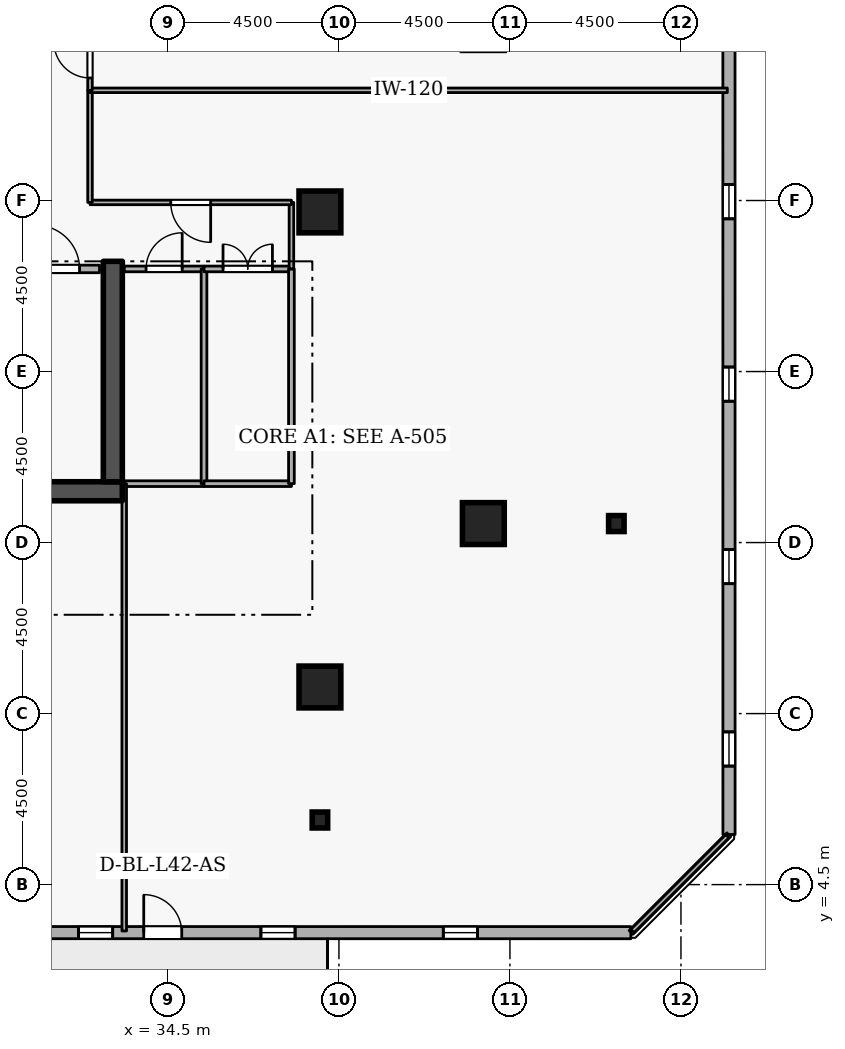
"""IFC4 building model, lengths in metres.
Left out: names, types, materials, properties, quantities, classifications, styles, units other than length and angle.
Written with IfcOpenShell. Run it as: python <this file> out.ifc"""

import sys

from ifc_helpers import new_model, si_unit, direction, frame, frame_2d, origin, origin_2d, place, context, subcontext, project, spatial, rectangle, i_section, extrude, element, fill, save


model = new_model("IFC4")
c1 = context("Model", 3, precision=1e-05, world=origin(), true_north=direction((0.0, 1.0)))
c2 = subcontext(c1, "Body", "Model", "MODEL_VIEW")
j1 = project(units=[si_unit("LENGTHUNIT", "METRE"), si_unit("PLANEANGLEUNIT", "RADIAN")], contexts=[c1])
p1 = place(None, origin())
s1 = spatial("IfcSite", under=j1, at=p1, CompositionType="ELEMENT")
p2 = place(p1, origin())
s2 = spatial("IfcBuilding", under=s1, at=p2, CompositionType="ELEMENT")
p3 = place(p2, frame((0.0, 0.0, 159.9)))
s3 = spatial("IfcBuildingStorey", under=s2, at=p3, CompositionType="ELEMENT", Elevation=159.9)
p4 = place(p3, frame((17.7, 14.85, 0.0), z_axis=(0.0, 0.0, 1.0), x_axis=(1.0, 0.0, 0.0)))
e1 = element("IfcWall", 1, at=p4, inside=s3, PredefinedType="SHEAR", context=c2, shape_type="SweptSolid", body=[
    extrude(rectangle(XDim=15.6, YDim=0.5, at=frame_2d((7.8, 0.0))), origin(), (0.0, 0.0, 1.0), 3.6),
])
p5 = place(p3, frame((33.05, 15.1, 0.0), z_axis=(0.0, 0.0, 1.0), x_axis=(0.0, 1.0, 0.0)))
e2 = element("IfcWall", 2, at=p5, inside=s3, PredefinedType="SHEAR", context=c2, shape_type="SweptSolid", body=[
    extrude(rectangle(XDim=5.8, YDim=0.5, at=frame_2d((2.9, 0.0))), origin(), (0.0, 0.0, 1.0), 3.6),
])
for number, where, z_axis, x_axis in (
    (3, (38.5, 9.7, 0.0), (0.0, 0.0, 1.0), (1.0, 0.0, 0.0)),
    (4, (42.8, 14.0, 0.0), (0.0, 0.0, 1.0), (1.0, 0.0, 0.0)),
    (5, (38.5, 22.2, 0.0), (0.0, 0.0, 1.0), (1.0, 0.0, 0.0)),
):
    element("IfcColumn", number, at=place(p3, frame(where, z_axis=z_axis, x_axis=x_axis)), inside=s3, PredefinedType="COLUMN", context=c2, shape_type="SweptSolid", body=[
        extrude(rectangle(XDim=1.1, YDim=1.1, at=origin_2d()), origin(), (0.0, 0.0, 1.0), 3.6),
    ])
for number, where, z_axis, x_axis in (
    (6, (38.5, 6.2, 0.0), (0.0, 0.0, 1.0), (1.0, 0.0, 0.0)),
    (7, (46.3, 14.0, 0.0), (0.0, 0.0, 1.0), (1.0, 0.0, 0.0)),
):
    element("IfcColumn", number, at=place(p3, frame(where, z_axis=z_axis, x_axis=x_axis)), inside=s3, PredefinedType="COLUMN", context=c2, shape_type="SweptSolid", body=[
        extrude(i_section(OverallWidth=0.407, OverallDepth=0.419, WebThickness=0.031, FlangeThickness=0.049, FilletRadius=0.015, at=origin_2d()), origin(), (0.0, 0.0, 1.0), 3.6),
    ])
p6 = place(p3, frame((11.146, 3.238, 0.0), z_axis=(0.0, 0.0, 1.0), x_axis=(0.999999997144, -7.5574884e-05, 0.0)))
e8 = element("IfcWall", 8, at=p6, inside=s3, PredefinedType="STANDARD", context=c2, shape_type="SweptSolid", body=[
    extrude(rectangle(XDim=35.535, YDim=0.32, at=frame_2d((17.768, 0.0))), origin(), (0.0, 0.0, 1.0), 2.7),
])
p7 = place(p6, frame((22.718, 0.0, 0.0)))
e9 = element("IfcOpeningElement", 9, at=p7, cuts=e8, PredefinedType="OPENING", context=c2, shape_type="SweptSolid", body=[
    extrude(rectangle(XDim=1.0, YDim=2.08, at=frame_2d((0.5, 1.04))), frame((0.0, 0.17, 0.0), z_axis=(0.0, -1.0, 0.0), x_axis=(1.0, 0.0, 0.0)), (0.0, 0.0, 1.0), 0.34),
])
p8 = place(p6, frame((1.8, 0.0, 0.72)))
e10 = element("IfcOpeningElement", 10, at=p8, cuts=e8, PredefinedType="OPENING", context=c2, shape_type="SweptSolid", body=[
    extrude(rectangle(XDim=0.9, YDim=1.75, at=frame_2d((0.45, 0.875))), frame((0.0, 0.17, 0.0), z_axis=(0.0, -1.0, 0.0), x_axis=(1.0, 0.0, 0.0)), (0.0, 0.0, 1.0), 0.34),
])
p9 = place(p6, frame((6.6, 0.0, 0.72)))
e11 = element("IfcOpeningElement", 11, at=p9, cuts=e8, PredefinedType="OPENING", context=c2, shape_type="SweptSolid", body=[
    extrude(rectangle(XDim=0.9, YDim=1.75, at=frame_2d((0.45, 0.875))), frame((0.0, 0.17, 0.0), z_axis=(0.0, -1.0, 0.0), x_axis=(1.0, 0.0, 0.0)), (0.0, 0.0, 1.0), 0.34),
])
p10 = place(p6, frame((11.4, 0.0, 0.72)))
e12 = element("IfcOpeningElement", 12, at=p10, cuts=e8, PredefinedType="OPENING", context=c2, shape_type="SweptSolid", body=[
    extrude(rectangle(XDim=0.9, YDim=1.75, at=frame_2d((0.45, 0.875))), frame((0.0, 0.17, 0.0), z_axis=(0.0, -1.0, 0.0), x_axis=(1.0, 0.0, 0.0)), (0.0, 0.0, 1.0), 0.34),
])
p11 = place(p6, frame((16.2, 0.0, 0.72)))
e13 = element("IfcOpeningElement", 13, at=p11, cuts=e8, PredefinedType="OPENING", context=c2, shape_type="SweptSolid", body=[
    extrude(rectangle(XDim=0.9, YDim=1.75, at=frame_2d((0.45, 0.875))), frame((0.0, 0.17, 0.0), z_axis=(0.0, -1.0, 0.0), x_axis=(1.0, 0.0, 0.0)), (0.0, 0.0, 1.0), 0.34),
])
p12 = place(p6, frame((21.0, 0.0, 0.72)))
e14 = element("IfcOpeningElement", 14, at=p12, cuts=e8, PredefinedType="OPENING", context=c2, shape_type="SweptSolid", body=[
    extrude(rectangle(XDim=0.9, YDim=1.75, at=frame_2d((0.45, 0.875))), frame((0.0, 0.17, 0.0), z_axis=(0.0, -1.0, 0.0), x_axis=(1.0, 0.0, 0.0)), (0.0, 0.0, 1.0), 0.34),
])
p13 = place(p6, frame((25.8, 0.0, 0.72)))
e15 = element("IfcOpeningElement", 15, at=p13, cuts=e8, PredefinedType="OPENING", context=c2, shape_type="SweptSolid", body=[
    extrude(rectangle(XDim=0.9, YDim=1.75, at=frame_2d((0.45, 0.875))), frame((0.0, 0.17, 0.0), z_axis=(0.0, -1.0, 0.0), x_axis=(1.0, 0.0, 0.0)), (0.0, 0.0, 1.0), 0.34),
])
p14 = place(p6, frame((30.6, 0.0, 0.72)))
e16 = element("IfcOpeningElement", 16, at=p14, cuts=e8, PredefinedType="OPENING", context=c2, shape_type="SweptSolid", body=[
    extrude(rectangle(XDim=0.9, YDim=1.75, at=frame_2d((0.45, 0.875))), frame((0.0, 0.17, 0.0), z_axis=(0.0, -1.0, 0.0), x_axis=(1.0, 0.0, 0.0)), (0.0, 0.0, 1.0), 0.34),
])
p15 = place(p3, frame((49.265, 5.819, 0.0), z_axis=(0.0, 0.0, 1.0), x_axis=(-7.5574884e-05, 0.999999997144, 0.0)))
e17 = element("IfcWall", 17, at=p15, inside=s3, PredefinedType="STANDARD", context=c2, shape_type="SweptSolid", body=[
    extrude(rectangle(XDim=35.535, YDim=0.32, at=frame_2d((17.768, 0.0))), origin(), (0.0, 0.0, 1.0), 2.7),
])
p16 = place(p15, frame((1.8, 0.0, 0.72)))
e18 = element("IfcOpeningElement", 18, at=p16, cuts=e17, PredefinedType="OPENING", context=c2, shape_type="SweptSolid", body=[
    extrude(rectangle(XDim=0.9, YDim=1.75, at=frame_2d((0.45, 0.875))), frame((0.0, 0.17, 0.0), z_axis=(0.0, -1.0, 0.0), x_axis=(1.0, 0.0, 0.0)), (0.0, 0.0, 1.0), 0.34),
])
p17 = place(p15, frame((6.6, 0.0, 0.72)))
e19 = element("IfcOpeningElement", 19, at=p17, cuts=e17, PredefinedType="OPENING", context=c2, shape_type="SweptSolid", body=[
    extrude(rectangle(XDim=0.9, YDim=1.75, at=frame_2d((0.45, 0.875))), frame((0.0, 0.17, 0.0), z_axis=(0.0, -1.0, 0.0), x_axis=(1.0, 0.0, 0.0)), (0.0, 0.0, 1.0), 0.34),
])
p18 = place(p15, frame((11.4, 0.0, 0.72)))
e20 = element("IfcOpeningElement", 20, at=p18, cuts=e17, PredefinedType="OPENING", context=c2, shape_type="SweptSolid", body=[
    extrude(rectangle(XDim=0.9, YDim=1.75, at=frame_2d((0.45, 0.875))), frame((0.0, 0.17, 0.0), z_axis=(0.0, -1.0, 0.0), x_axis=(1.0, 0.0, 0.0)), (0.0, 0.0, 1.0), 0.34),
])
p19 = place(p15, frame((16.2, 0.0, 0.72)))
e21 = element("IfcOpeningElement", 21, at=p19, cuts=e17, PredefinedType="OPENING", context=c2, shape_type="SweptSolid", body=[
    extrude(rectangle(XDim=0.9, YDim=1.75, at=frame_2d((0.45, 0.875))), frame((0.0, 0.17, 0.0), z_axis=(0.0, -1.0, 0.0), x_axis=(1.0, 0.0, 0.0)), (0.0, 0.0, 1.0), 0.34),
])
p20 = place(p15, frame((25.8, 0.0, 0.72)))
e22 = element("IfcOpeningElement", 22, at=p20, cuts=e17, PredefinedType="OPENING", context=c2, shape_type="SweptSolid", body=[
    extrude(rectangle(XDim=0.9, YDim=1.75, at=frame_2d((0.45, 0.875))), frame((0.0, 0.17, 0.0), z_axis=(0.0, -1.0, 0.0), x_axis=(1.0, 0.0, 0.0)), (0.0, 0.0, 1.0), 0.34),
])
p21 = place(p15, frame((30.6, 0.0, 0.72)))
e23 = element("IfcOpeningElement", 23, at=p21, cuts=e17, PredefinedType="OPENING", context=c2, shape_type="SweptSolid", body=[
    extrude(rectangle(XDim=0.9, YDim=1.75, at=frame_2d((0.45, 0.875))), frame((0.0, 0.17, 0.0), z_axis=(0.0, -1.0, 0.0), x_axis=(1.0, 0.0, 0.0)), (0.0, 0.0, 1.0), 0.34),
])
p22 = place(p3, frame((30.5, 20.7, 0.0), z_axis=(0.0, 0.0, 1.0), x_axis=(1.0, 0.0, 0.0)))
e24 = element("IfcWall", 24, at=p22, inside=s3, PredefinedType="STANDARD", context=c2, shape_type="SweptSolid", body=[
    extrude(rectangle(XDim=2.2, YDim=0.2, at=frame_2d((1.1, 0.0))), origin(), (0.0, 0.0, 1.0), 3.34),
])
p23 = place(p22, frame((0.525, 0.0, 0.0)))
e25 = element("IfcOpeningElement", 25, at=p23, cuts=e24, PredefinedType="OPENING", context=c2, shape_type="SweptSolid", body=[
    extrude(rectangle(XDim=1.15, YDim=2.1, at=frame_2d((0.575, 1.05))), frame((0.0, 0.11, 0.0), z_axis=(0.0, -1.0, 0.0), x_axis=(1.0, 0.0, 0.0)), (0.0, 0.0, 1.0), 0.22),
])
p24 = place(p3, frame((35.45, 15.05, 0.0), z_axis=(0.0, 0.0, 1.0), x_axis=(-1.0, 0.0, 0.0)))
e26 = element("IfcWall", 26, at=p24, inside=s3, PredefinedType="PARTITIONING", context=c2, shape_type="SweptSolid", body=[
    extrude(rectangle(XDim=2.1, YDim=0.15, at=frame_2d((1.05, 0.0))), origin(), (0.0, 0.0, 1.0), 3.34),
])
p25 = place(p3, frame((33.35, 20.7, 0.0), z_axis=(0.0, 0.0, 1.0), x_axis=(1.0, 0.0, 0.0)))
e27 = element("IfcWall", 27, at=p25, inside=s3, PredefinedType="PARTITIONING", context=c2, shape_type="SweptSolid", body=[
    extrude(rectangle(XDim=2.1, YDim=0.15, at=frame_2d((1.05, 0.0))), origin(), (0.0, 0.0, 1.0), 3.34),
])
p26 = place(p25, frame((0.575, 0.0, 0.0)))
e28 = element("IfcOpeningElement", 28, at=p26, cuts=e27, PredefinedType="OPENING", context=c2, shape_type="SweptSolid", body=[
    extrude(rectangle(XDim=0.95, YDim=2.1, at=frame_2d((0.475, 1.05))), frame((0.0, 0.085, 0.0), z_axis=(0.0, -1.0, 0.0), x_axis=(1.0, 0.0, 0.0)), (0.0, 0.0, 1.0), 0.17),
])
p27 = place(p3, frame((35.45, 20.7, 0.0), z_axis=(0.0, 0.0, 1.0), x_axis=(0.0, -1.0, 0.0)))
e29 = element("IfcWall", 29, at=p27, inside=s3, PredefinedType="PARTITIONING", context=c2, shape_type="SweptSolid", body=[
    extrude(rectangle(XDim=5.65, YDim=0.15, at=frame_2d((2.825, 0.0))), origin(), (0.0, 0.0, 1.0), 3.34),
])
p28 = place(p3, frame((37.75, 15.05, 0.0), z_axis=(0.0, 0.0, 1.0), x_axis=(-1.0, 0.0, 0.0)))
e30 = element("IfcWall", 30, at=p28, inside=s3, PredefinedType="PARTITIONING", context=c2, shape_type="SweptSolid", body=[
    extrude(rectangle(XDim=2.3, YDim=0.15, at=frame_2d((1.15, 0.0))), origin(), (0.0, 0.0, 1.0), 3.34),
])
p29 = place(p3, frame((35.45, 20.7, 0.0), z_axis=(0.0, 0.0, 1.0), x_axis=(1.0, 0.0, 0.0)))
e31 = element("IfcWall", 31, at=p29, inside=s3, PredefinedType="PARTITIONING", context=c2, shape_type="SweptSolid", body=[
    extrude(rectangle(XDim=2.3, YDim=0.15, at=frame_2d((1.15, 0.0))), origin(), (0.0, 0.0, 1.0), 3.34),
])
p30 = place(p29, frame((0.5, 0.0, 0.0)))
e32 = element("IfcOpeningElement", 32, at=p30, cuts=e31, PredefinedType="OPENING", context=c2, shape_type="SweptSolid", body=[
    extrude(rectangle(XDim=1.3, YDim=2.12, at=frame_2d((0.65, 1.06))), frame((0.0, 0.085, 0.0), z_axis=(0.0, -1.0, 0.0), x_axis=(1.0, 0.0, 0.0)), (0.0, 0.0, 1.0), 0.17),
])
p31 = place(p3, frame((37.75, 20.7, 0.0), z_axis=(0.0, 0.0, 1.0), x_axis=(0.0, -1.0, 0.0)))
e33 = element("IfcWall", 33, at=p31, inside=s3, PredefinedType="PARTITIONING", context=c2, shape_type="SweptSolid", body=[
    extrude(rectangle(XDim=5.65, YDim=0.15, at=frame_2d((2.825, 0.0))), origin(), (0.0, 0.0, 1.0), 3.34),
])
p32 = place(p3, frame((33.35, 3.28, 0.0), z_axis=(0.0, 0.0, 1.0), x_axis=(0.0, 1.0, 0.0)))
e34 = element("IfcWall", 34, at=p32, inside=s3, PredefinedType="PARTITIONING", context=c2, shape_type="SweptSolid", body=[
    extrude(rectangle(XDim=11.77, YDim=0.12, at=frame_2d((5.885, 0.0))), origin(), (0.0, 0.0, 1.0), 2.545),
])
p33 = place(p3, frame((37.75, 20.7, 0.0), z_axis=(0.0, 0.0, 1.0), x_axis=(0.0, 1.0, 0.0)))
e35 = element("IfcWall", 35, at=p33, inside=s3, PredefinedType="PARTITIONING", context=c2, shape_type="SweptSolid", body=[
    extrude(rectangle(XDim=1.75, YDim=0.12, at=frame_2d((0.875, 0.0))), origin(), (0.0, 0.0, 1.0), 3.34),
])
p34 = place(p3, frame((37.75, 22.45, 0.0), z_axis=(0.0, 0.0, 1.0), x_axis=(-1.0, 0.0, 0.0)))
e36 = element("IfcWall", 36, at=p34, inside=s3, PredefinedType="PARTITIONING", context=c2, shape_type="SweptSolid", body=[
    extrude(rectangle(XDim=5.3, YDim=0.12, at=frame_2d((2.65, 0.0))), origin(), (0.0, 0.0, 1.0), 3.34),
])
p35 = place(p34, frame((2.125, 0.0, 0.0)))
e37 = element("IfcOpeningElement", 37, at=p35, cuts=e36, PredefinedType="OPENING", context=c2, shape_type="SweptSolid", body=[
    extrude(rectangle(XDim=1.05, YDim=2.1, at=frame_2d((0.525, 1.05))), frame((0.0, 0.07, 0.0), z_axis=(0.0, -1.0, 0.0), x_axis=(1.0, 0.0, 0.0)), (0.0, 0.0, 1.0), 0.14),
])
p36 = place(p3, frame((32.45, 22.45, 0.0), z_axis=(0.0, 0.0, 1.0), x_axis=(0.0, 1.0, 0.0)))
e38 = element("IfcWall", 38, at=p36, inside=s3, PredefinedType="PARTITIONING", context=c2, shape_type="SweptSolid", body=[
    extrude(rectangle(XDim=2.95, YDim=0.12, at=frame_2d((1.475, 0.0))), origin(), (0.0, 0.0, 1.0), 3.34),
])
p37 = place(p3, frame((32.45, 25.4, 0.0), z_axis=(0.0, 0.0, 1.0), x_axis=(1.0, 0.0, 0.0)))
e39 = element("IfcWall", 39, at=p37, inside=s3, PredefinedType="PARTITIONING", context=c2, shape_type="SweptSolid", body=[
    extrude(rectangle(XDim=16.77, YDim=0.12, at=frame_2d((8.385, 0.0))), origin(), (0.0, 0.0, 1.0), 3.34),
])
p38 = place(p3, frame((49.22, 5.775, 0.0), z_axis=(0.0, 0.0, 1.0), x_axis=(-0.707106781187, -0.707106781187, 0.0)))
e40 = element("IfcWall", 40, at=p38, inside=s3, PredefinedType="PARTITIONING", context=c2, shape_type="SweptSolid", body=[
    extrude(rectangle(XDim=3.528, YDim=0.12, at=frame_2d((1.764, 0.0))), origin(), (0.0, 0.0, 1.0), 3.34),
])
p39 = place(p3, frame((32.45, 25.4, 0.0), z_axis=(0.0, 0.0, 1.0), x_axis=(0.0, 1.0, 0.0)))
e41 = element("IfcWall", 41, at=p39, inside=s3, PredefinedType="PARTITIONING", context=c2, shape_type="SweptSolid", body=[
    extrude(rectangle(XDim=1.6, YDim=0.12, at=frame_2d((0.8, 0.0))), origin(), (0.0, 0.0, 1.0), 3.34),
])
p40 = place(p39, frame((0.325, 0.0, 0.0)))
e42 = element("IfcOpeningElement", 42, at=p40, cuts=e41, PredefinedType="OPENING", context=c2, shape_type="SweptSolid", body=[
    extrude(rectangle(XDim=0.95, YDim=2.1, at=frame_2d((0.475, 1.05))), frame((0.0, 0.07, 0.0), z_axis=(0.0, -1.0, 0.0), x_axis=(1.0, 0.0, 0.0)), (0.0, 0.0, 1.0), 0.14),
])
p41 = place(p7, origin())
e43 = element("IfcDoor", 43, at=p41, inside=s3, OperationType="SINGLE_SWING_LEFT", PredefinedType="DOOR", context=c2, shape_type="SweptSolid", body=[
    extrude(rectangle(XDim=1.0, YDim=2.08, at=frame_2d((0.5, 1.04))), frame((0.0, 0.025, 0.0), z_axis=(0.0, -1.0, 0.0), x_axis=(1.0, 0.0, 0.0)), (0.0, 0.0, 1.0), 0.05),
])
fill(e9, e43)
p42 = place(p12, origin())
e44 = element("IfcWindow", 44, at=p42, inside=s3, PartitioningType="SINGLE_PANEL", PredefinedType="WINDOW", context=c2, shape_type="SweptSolid", body=[
    extrude(rectangle(XDim=0.9, YDim=1.75, at=frame_2d((0.45, 0.875))), frame((0.0, 0.03, 0.0), z_axis=(0.0, -1.0, 0.0), x_axis=(1.0, 0.0, 0.0)), (0.0, 0.0, 1.0), 0.06),
])
fill(e14, e44)
p43 = place(p13, origin())
e45 = element("IfcWindow", 45, at=p43, inside=s3, PartitioningType="SINGLE_PANEL", PredefinedType="WINDOW", context=c2, shape_type="SweptSolid", body=[
    extrude(rectangle(XDim=0.9, YDim=1.75, at=frame_2d((0.45, 0.875))), frame((0.0, 0.03, 0.0), z_axis=(0.0, -1.0, 0.0), x_axis=(1.0, 0.0, 0.0)), (0.0, 0.0, 1.0), 0.06),
])
fill(e15, e45)
p44 = place(p14, origin())
e46 = element("IfcWindow", 46, at=p44, inside=s3, PartitioningType="SINGLE_PANEL", PredefinedType="WINDOW", context=c2, shape_type="SweptSolid", body=[
    extrude(rectangle(XDim=0.9, YDim=1.75, at=frame_2d((0.45, 0.875))), frame((0.0, 0.03, 0.0), z_axis=(0.0, -1.0, 0.0), x_axis=(1.0, 0.0, 0.0)), (0.0, 0.0, 1.0), 0.06),
])
fill(e16, e46)
p45 = place(p16, origin())
e47 = element("IfcWindow", 47, at=p45, inside=s3, PartitioningType="SINGLE_PANEL", PredefinedType="WINDOW", context=c2, shape_type="SweptSolid", body=[
    extrude(rectangle(XDim=0.9, YDim=1.75, at=frame_2d((0.45, 0.875))), frame((0.0, 0.03, 0.0), z_axis=(0.0, -1.0, 0.0), x_axis=(1.0, 0.0, 0.0)), (0.0, 0.0, 1.0), 0.06),
])
fill(e18, e47)
p46 = place(p17, origin())
e48 = element("IfcWindow", 48, at=p46, inside=s3, PartitioningType="SINGLE_PANEL", PredefinedType="WINDOW", context=c2, shape_type="SweptSolid", body=[
    extrude(rectangle(XDim=0.9, YDim=1.75, at=frame_2d((0.45, 0.875))), frame((0.0, 0.03, 0.0), z_axis=(0.0, -1.0, 0.0), x_axis=(1.0, 0.0, 0.0)), (0.0, 0.0, 1.0), 0.06),
])
fill(e19, e48)
p47 = place(p18, origin())
e49 = element("IfcWindow", 49, at=p47, inside=s3, PartitioningType="SINGLE_PANEL", PredefinedType="WINDOW", context=c2, shape_type="SweptSolid", body=[
    extrude(rectangle(XDim=0.9, YDim=1.75, at=frame_2d((0.45, 0.875))), frame((0.0, 0.03, 0.0), z_axis=(0.0, -1.0, 0.0), x_axis=(1.0, 0.0, 0.0)), (0.0, 0.0, 1.0), 0.06),
])
fill(e20, e49)
p48 = place(p19, origin())
e50 = element("IfcWindow", 50, at=p48, inside=s3, PartitioningType="SINGLE_PANEL", PredefinedType="WINDOW", context=c2, shape_type="SweptSolid", body=[
    extrude(rectangle(XDim=0.9, YDim=1.75, at=frame_2d((0.45, 0.875))), frame((0.0, 0.03, 0.0), z_axis=(0.0, -1.0, 0.0), x_axis=(1.0, 0.0, 0.0)), (0.0, 0.0, 1.0), 0.06),
])
fill(e21, e50)
p49 = place(p23, origin())
e51 = element("IfcDoor", 51, at=p49, inside=s3, OperationType="SINGLE_SWING_LEFT", PredefinedType="DOOR", context=c2, shape_type="SweptSolid", body=[
    extrude(rectangle(XDim=1.15, YDim=2.1, at=frame_2d((0.575, 1.05))), frame((0.0, 0.025, 0.0), z_axis=(0.0, -1.0, 0.0), x_axis=(1.0, 0.0, 0.0)), (0.0, 0.0, 1.0), 0.05),
])
fill(e25, e51)
p50 = place(p26, origin())
e52 = element("IfcDoor", 52, at=p50, inside=s3, OperationType="SINGLE_SWING_RIGHT", PredefinedType="DOOR", context=c2, shape_type="SweptSolid", body=[
    extrude(rectangle(XDim=0.95, YDim=2.1, at=frame_2d((0.475, 1.05))), frame((0.0, 0.025, 0.0), z_axis=(0.0, -1.0, 0.0), x_axis=(1.0, 0.0, 0.0)), (0.0, 0.0, 1.0), 0.05),
])
fill(e28, e52)
p51 = place(p30, origin())
e53 = element("IfcDoor", 53, at=p51, inside=s3, OperationType="DOUBLE_DOOR_SINGLE_SWING", PredefinedType="DOOR", context=c2, shape_type="SweptSolid", body=[
    extrude(rectangle(XDim=1.3, YDim=2.12, at=frame_2d((0.65, 1.06))), frame((0.0, 0.025, 0.0), z_axis=(0.0, -1.0, 0.0), x_axis=(1.0, 0.0, 0.0)), (0.0, 0.0, 1.0), 0.05),
])
fill(e32, e53)
p52 = place(p35, origin())
e54 = element("IfcDoor", 54, at=p52, inside=s3, OperationType="SINGLE_SWING_LEFT", PredefinedType="DOOR", context=c2, shape_type="SweptSolid", body=[
    extrude(rectangle(XDim=1.05, YDim=2.1, at=frame_2d((0.525, 1.05))), frame((0.0, 0.025, 0.0), z_axis=(0.0, -1.0, 0.0), x_axis=(1.0, 0.0, 0.0)), (0.0, 0.0, 1.0), 0.05),
])
fill(e37, e54)
p53 = place(p40, origin())
e55 = element("IfcDoor", 55, at=p53, inside=s3, OperationType="SINGLE_SWING_RIGHT", PredefinedType="DOOR", context=c2, shape_type="SweptSolid", body=[
    extrude(rectangle(XDim=0.95, YDim=2.1, at=frame_2d((0.475, 1.05))), frame((0.0, 0.025, 0.0), z_axis=(0.0, -1.0, 0.0), x_axis=(1.0, 0.0, 0.0)), (0.0, 0.0, 1.0), 0.05),
])
fill(e42, e55)
save(model, sys.argv[1])
